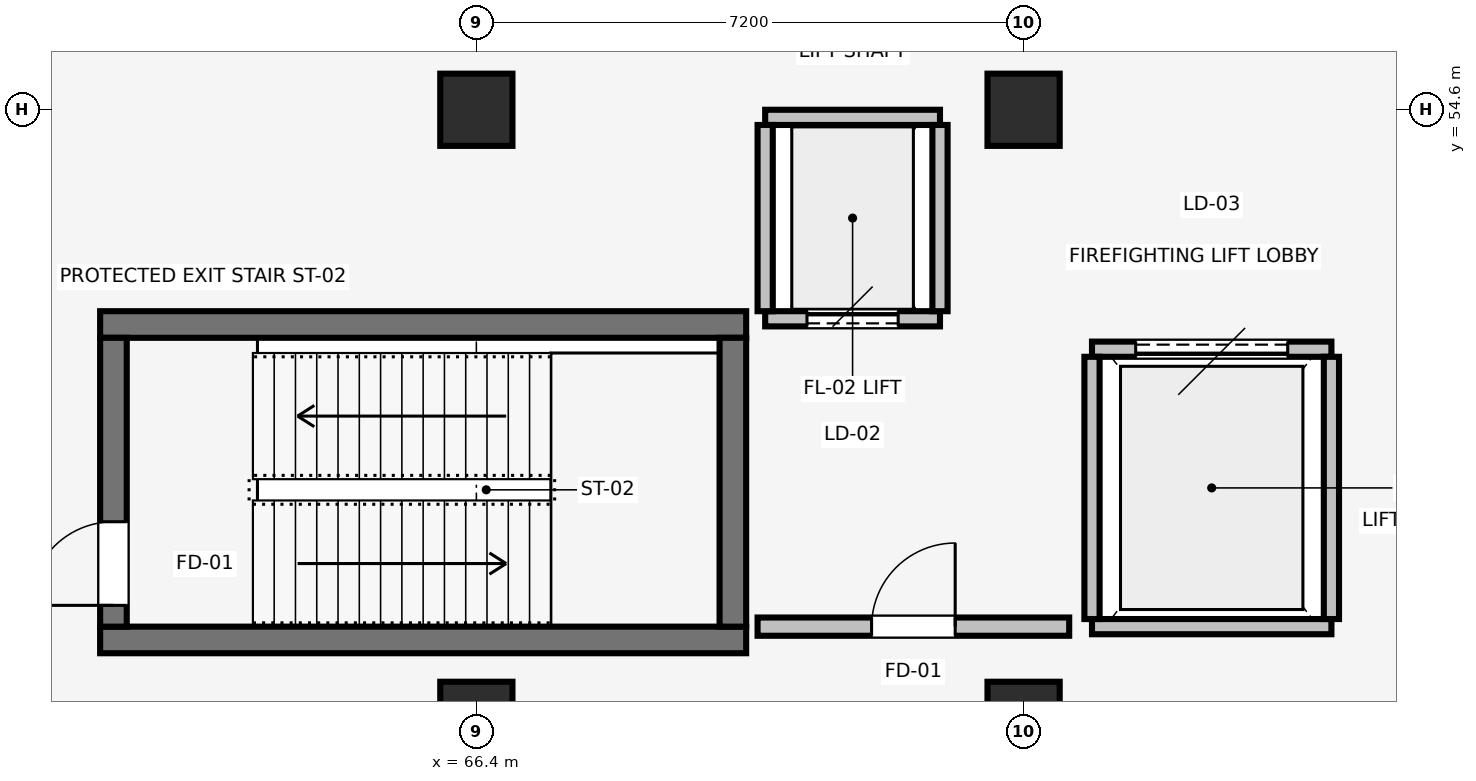
"""IFC4 building model, lengths in metres.
Left out: names, types, materials, properties, quantities, classifications, styles, units other than length and angle.
Written with IfcOpenShell. Run it as: python <this file> out.ifc"""

import sys

from ifc_helpers import new_model, si_unit, direction, frame, frame_2d, origin, origin_2d, place, context, subcontext, project, spatial, rectangle, extrude, element, fill, save


model = new_model("IFC4")
c1 = context("Model", 3, precision=1e-05, world=origin(), true_north=direction((0.0, 1.0)))
c2 = subcontext(c1, "Body", "Model", "MODEL_VIEW")
j1 = project(units=[si_unit("LENGTHUNIT", "METRE"), si_unit("PLANEANGLEUNIT", "RADIAN")], contexts=[c1])
p1 = place(None, origin())
s1 = spatial("IfcSite", under=j1, at=p1, CompositionType="ELEMENT")
p2 = place(p1, origin())
s2 = spatial("IfcBuilding", under=s1, at=p2, CompositionType="ELEMENT")
p3 = place(p2, origin())
s3 = spatial("IfcBuildingStorey", under=s2, at=p3, CompositionType="ELEMENT", Elevation=0.0)
for number, where, z_axis, x_axis in (
    (1, (66.4, 46.6, 0.0), (0.0, 0.0, 1.0), (1.0, 0.0, 0.0)),
    (2, (66.4, 54.6, 0.0), (0.0, 0.0, 1.0), (1.0, 0.0, 0.0)),
    (3, (73.6, 46.6, 0.0), (0.0, 0.0, 1.0), (1.0, 0.0, 0.0)),
    (4, (73.6, 54.6, 0.0), (0.0, 0.0, 1.0), (1.0, 0.0, 0.0)),
):
    element("IfcColumn", number, at=place(p3, frame(where, z_axis=z_axis, x_axis=x_axis)), inside=s3, PredefinedType="COLUMN", context=c2, shape_type="SweptSolid", body=[
        extrude(rectangle(XDim=0.95, YDim=0.95, at=origin_2d()), origin(), (0.0, 0.0, 1.0), 5.4),
    ])
for number, where, z_axis, x_axis in (
    (5, (61.45, 47.625, 0.0), (0.0, 0.0, 1.0), (1.0, 0.0, 0.0)),
    (6, (69.95, 51.775, 0.0), (0.0, 0.0, 1.0), (-1.0, 0.0, 0.0)),
):
    element("IfcWall", number, at=place(p3, frame(where, z_axis=z_axis, x_axis=x_axis)), inside=s3, PredefinedType="SHEAR", context=c2, shape_type="SweptSolid", body=[
        extrude(rectangle(XDim=8.5, YDim=0.35, at=frame_2d((4.25, 0.0))), origin(), (0.0, 0.0, 1.0), 5.1),
    ])
p4 = place(p3, frame((61.625, 47.8, 0.0), z_axis=(0.0, 0.0, 1.0), x_axis=(0.0, 1.0, 0.0)))
e7 = element("IfcWall", 7, at=p4, inside=s3, PredefinedType="SHEAR", context=c2, shape_type="SweptSolid", body=[
    extrude(rectangle(XDim=3.8, YDim=0.35, at=frame_2d((1.9, 0.0))), origin(), (0.0, 0.0, 1.0), 5.1),
])
p5 = place(p4, frame((0.28, 0.0, 0.0)))
e8 = element("IfcOpeningElement", 8, at=p5, cuts=e7, PredefinedType="OPENING", context=c2, shape_type="SweptSolid", body=[
    extrude(rectangle(XDim=1.1, YDim=2.08, at=frame_2d((0.55, 1.04))), frame((0.0, 0.185, 0.0), z_axis=(0.0, -1.0, 0.0), x_axis=(1.0, 0.0, 0.0)), (0.0, 0.0, 1.0), 0.37),
])
p6 = place(p3, frame((69.775, 51.6, 0.0), z_axis=(0.0, 0.0, 1.0), x_axis=(0.0, -1.0, 0.0)))
e9 = element("IfcWall", 9, at=p6, inside=s3, PredefinedType="SHEAR", context=c2, shape_type="SweptSolid", body=[
    extrude(rectangle(XDim=3.8, YDim=0.35, at=frame_2d((1.9, 0.0))), origin(), (0.0, 0.0, 1.0), 5.1),
])
p7 = place(p3, frame((70.2, 51.85, 0.0), z_axis=(0.0, 0.0, 1.0), x_axis=(1.0, 0.0, 0.0)))
e10 = element("IfcWall", 10, at=p7, inside=s3, PredefinedType="PARTITIONING", context=c2, shape_type="SweptSolid", body=[
    extrude(rectangle(XDim=2.3, YDim=0.2, at=frame_2d((1.15, 0.0))), origin(), (0.0, 0.0, 1.0), 5.092),
])
p8 = place(p7, frame((0.55, 0.0, 0.0)))
e11 = element("IfcOpeningElement", 11, at=p8, cuts=e10, PredefinedType="OPENING", context=c2, shape_type="SweptSolid", body=[
    extrude(rectangle(XDim=1.2, YDim=2.15, at=frame_2d((0.6, 1.075))), frame((0.0, 0.11, 0.0), z_axis=(0.0, -1.0, 0.0), x_axis=(1.0, 0.0, 0.0)), (0.0, 0.0, 1.0), 0.22),
])
p9 = place(p3, frame((72.5, 54.5, 0.0), z_axis=(0.0, 0.0, 1.0), x_axis=(-1.0, 0.0, 0.0)))
e12 = element("IfcWall", 12, at=p9, inside=s3, PredefinedType="PARTITIONING", context=c2, shape_type="SweptSolid", body=[
    extrude(rectangle(XDim=2.3, YDim=0.2, at=frame_2d((1.15, 0.0))), origin(), (0.0, 0.0, 1.0), 4.342),
])
for number, where, z_axis, x_axis in (
    (13, (70.2, 51.95, 0.0), (0.0, 0.0, 1.0), (0.0, 1.0, 0.0)),
    (14, (72.5, 54.4, 0.0), (0.0, 0.0, 1.0), (0.0, -1.0, 0.0)),
):
    element("IfcWall", number, at=place(p3, frame(where, z_axis=z_axis, x_axis=x_axis)), inside=s3, PredefinedType="PARTITIONING", context=c2, shape_type="SweptSolid", body=[
        extrude(rectangle(XDim=2.45, YDim=0.2, at=frame_2d((1.225, 0.0))), origin(), (0.0, 0.0, 1.0), 5.092),
    ])
p10 = place(p3, frame((74.5, 47.8, 0.0), z_axis=(0.0, 0.0, 1.0), x_axis=(1.0, 0.0, 0.0)))
e15 = element("IfcWall", 15, at=p10, inside=s3, PredefinedType="PARTITIONING", context=c2, shape_type="SweptSolid", body=[
    extrude(rectangle(XDim=3.15, YDim=0.2, at=frame_2d((1.575, 0.0))), origin(), (0.0, 0.0, 1.0), 5.092),
])
p11 = place(p3, frame((77.65, 51.45, 0.0), z_axis=(0.0, 0.0, 1.0), x_axis=(-1.0, 0.0, 0.0)))
e16 = element("IfcWall", 16, at=p11, inside=s3, PredefinedType="PARTITIONING", context=c2, shape_type="SweptSolid", body=[
    extrude(rectangle(XDim=3.15, YDim=0.2, at=frame_2d((1.575, 0.0))), origin(), (0.0, 0.0, 1.0), 5.092),
])
p12 = place(p11, frame((0.575, 0.0, 0.0)))
e17 = element("IfcOpeningElement", 17, at=p12, cuts=e16, PredefinedType="OPENING", context=c2, shape_type="SweptSolid", body=[
    extrude(rectangle(XDim=2.0, YDim=2.35, at=frame_2d((1.0, 1.175))), frame((0.0, 0.11, 0.0), z_axis=(0.0, -1.0, 0.0), x_axis=(1.0, 0.0, 0.0)), (0.0, 0.0, 1.0), 0.22),
])
for number, where, z_axis, x_axis in (
    (18, (74.5, 47.9, 0.0), (0.0, 0.0, 1.0), (0.0, 1.0, 0.0)),
    (19, (77.65, 51.35, 0.0), (0.0, 0.0, 1.0), (0.0, -1.0, 0.0)),
):
    element("IfcWall", number, at=place(p3, frame(where, z_axis=z_axis, x_axis=x_axis)), inside=s3, PredefinedType="PARTITIONING", context=c2, shape_type="SweptSolid", body=[
        extrude(rectangle(XDim=3.45, YDim=0.2, at=frame_2d((1.725, 0.0))), origin(), (0.0, 0.0, 1.0), 5.092),
    ])
p13 = place(p3, frame((70.1, 47.8, 0.0), z_axis=(0.0, 0.0, 1.0), x_axis=(1.0, 0.0, 0.0)))
e20 = element("IfcWall", 20, at=p13, inside=s3, PredefinedType="PARTITIONING", context=c2, shape_type="SweptSolid", body=[
    extrude(rectangle(XDim=4.1, YDim=0.24, at=frame_2d((2.05, 0.0))), origin(), (0.0, 0.0, 1.0), 5.092),
])
p14 = place(p13, frame((1.5, 0.0, 0.0)))
e21 = element("IfcOpeningElement", 21, at=p14, cuts=e20, PredefinedType="OPENING", context=c2, shape_type="SweptSolid", body=[
    extrude(rectangle(XDim=1.1, YDim=2.08, at=frame_2d((0.55, 1.04))), frame((0.0, 0.13, 0.0), z_axis=(0.0, -1.0, 0.0), x_axis=(1.0, 0.0, 0.0)), (0.0, 0.0, 1.0), 0.26),
])
p15 = place(p5, origin())
e22 = element("IfcDoor", 22, at=p15, inside=s3, OperationType="SINGLE_SWING_LEFT", PredefinedType="DOOR", context=c2, shape_type="SweptSolid", body=[
    extrude(rectangle(XDim=1.1, YDim=2.08, at=frame_2d((0.55, 1.04))), frame((0.0, 0.025, 0.0), z_axis=(0.0, -1.0, 0.0), x_axis=(1.0, 0.0, 0.0)), (0.0, 0.0, 1.0), 0.05),
])
fill(e8, e22)
p16 = place(p8, origin())
e23 = element("IfcDoor", 23, at=p16, inside=s3, OperationType="SLIDING_TO_LEFT", PredefinedType="DOOR", context=c2, shape_type="SweptSolid", body=[
    extrude(rectangle(XDim=1.2, YDim=2.15, at=frame_2d((0.6, 1.075))), frame((0.0, 0.025, 0.0), z_axis=(0.0, -1.0, 0.0), x_axis=(1.0, 0.0, 0.0)), (0.0, 0.0, 1.0), 0.05),
])
fill(e11, e23)
p17 = place(p12, origin())
e24 = element("IfcDoor", 24, at=p17, inside=s3, OperationType="SLIDING_TO_LEFT", PredefinedType="DOOR", context=c2, shape_type="SweptSolid", body=[
    extrude(rectangle(XDim=2.0, YDim=2.35, at=frame_2d((1.0, 1.175))), frame((0.0, 0.025, 0.0), z_axis=(0.0, -1.0, 0.0), x_axis=(1.0, 0.0, 0.0)), (0.0, 0.0, 1.0), 0.05),
])
fill(e17, e24)
p18 = place(p14, origin())
e25 = element("IfcDoor", 25, at=p18, inside=s3, OperationType="SINGLE_SWING_RIGHT", PredefinedType="DOOR", context=c2, shape_type="SweptSolid", body=[
    extrude(rectangle(XDim=1.1, YDim=2.08, at=frame_2d((0.55, 1.04))), frame((0.0, 0.025, 0.0), z_axis=(0.0, -1.0, 0.0), x_axis=(1.0, 0.0, 0.0)), (0.0, 0.0, 1.0), 0.05),
])
fill(e21, e25)
save(model, sys.argv[1])
